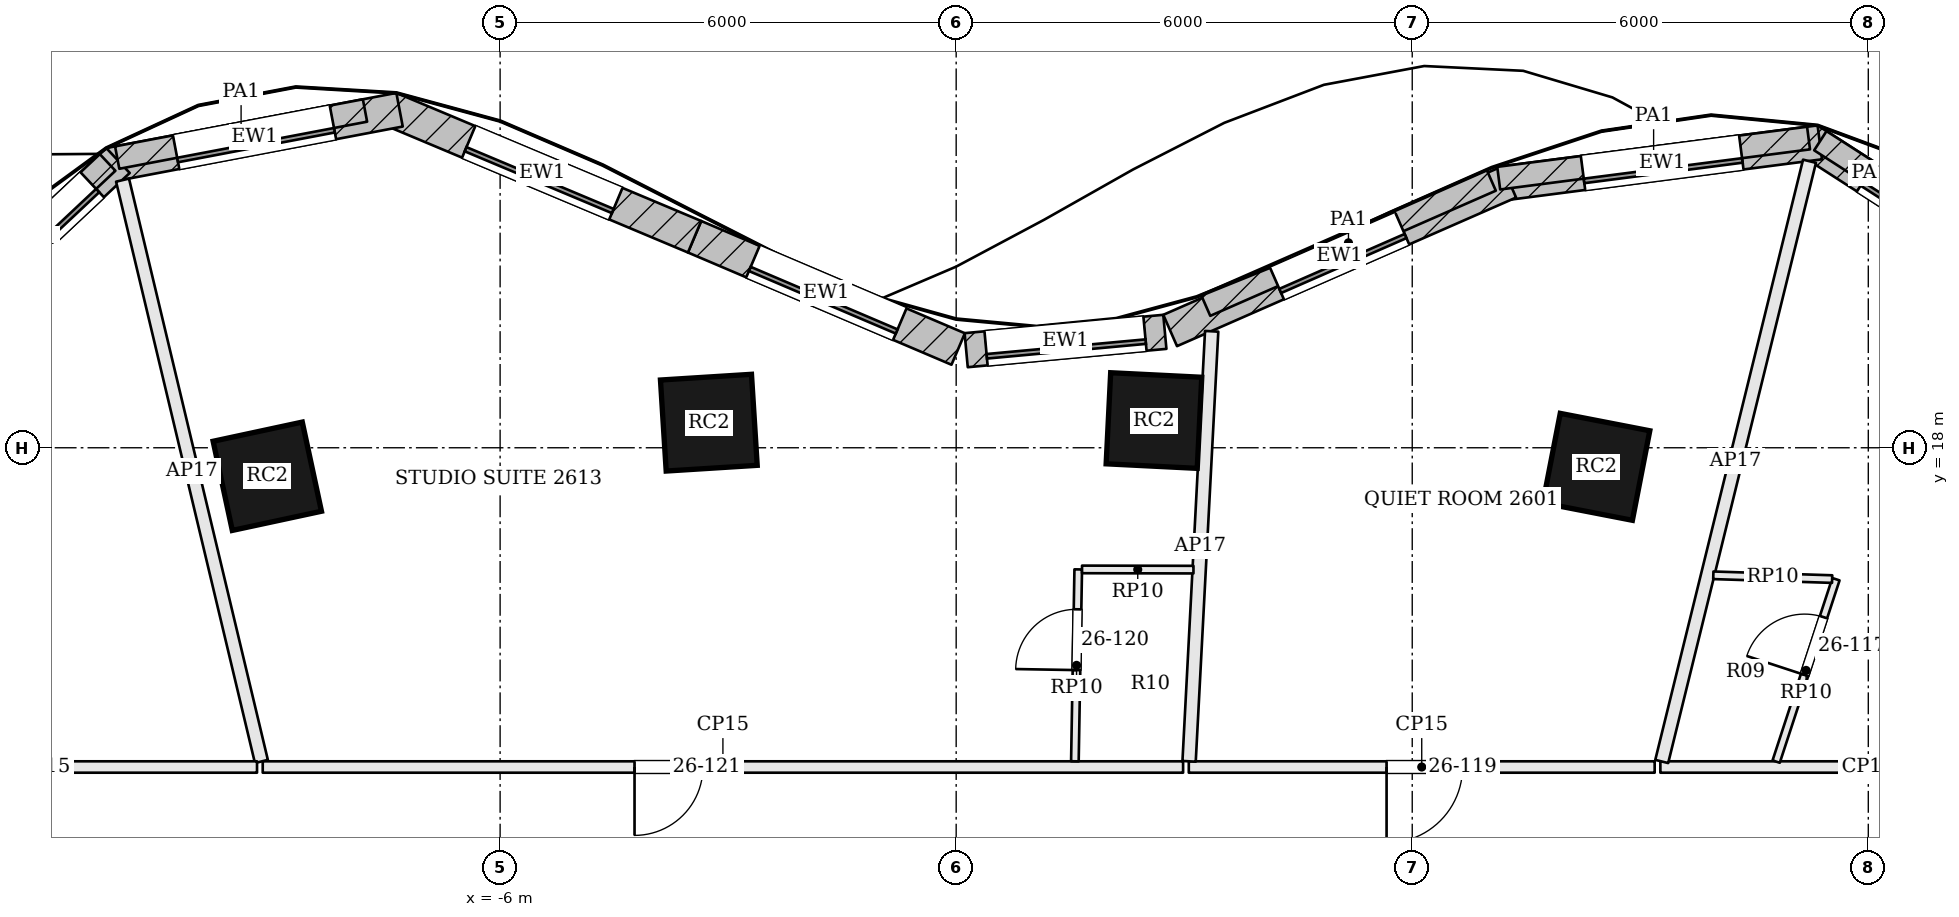
"""IFC4 building model, lengths in metres.
Left out: names, types, materials, properties, quantities, classifications, styles, units other than length and angle.
Written with IfcOpenShell. Run it as: python <this file> out.ifc"""

import sys

from ifc_helpers import new_model, si_unit, direction, frame, frame_2d, origin, origin_2d, place, context, subcontext, project, spatial, rectangle, extrude, element, fill, save


model = new_model("IFC4")
c1 = context("Model", 3, precision=1e-05, world=origin(), true_north=direction((0.0, 1.0)))
c2 = subcontext(c1, "Body", "Model", "MODEL_VIEW")
j1 = project(units=[si_unit("LENGTHUNIT", "METRE"), si_unit("PLANEANGLEUNIT", "RADIAN")], contexts=[c1])
p1 = place(None, origin())
s1 = spatial("IfcSite", under=j1, at=p1, CompositionType="ELEMENT")
p2 = place(p1, origin())
s2 = spatial("IfcBuilding", under=s1, at=p2, CompositionType="ELEMENT")
p3 = place(p2, frame((0.0, 0.0, 110.4)))
s3 = spatial("IfcBuildingStorey", under=s2, at=p3, CompositionType="ELEMENT", Elevation=110.4)
for number, where, z_axis, x_axis in (
    (1, (8.422, 17.749, 0.0), (0.0, 0.0, 1.0), (-0.982, 0.191, 0.0)),
    (2, (2.602, 18.358, 0.0), (0.0, 0.0, 1.0), (-0.999, 0.05, 0.0)),
    (3, (-3.254, 18.33, 0.0), (0.0, 0.0, 1.0), (-0.998, -0.063, 0.0)),
    (4, (-9.063, 17.625, 0.0), (0.0, 0.0, 1.0), (-0.978, -0.21, 0.0)),
):
    element("IfcColumn", number, at=place(p3, frame(where, z_axis=z_axis, x_axis=x_axis)), inside=s3, PredefinedType="COLUMN", context=c2, shape_type="SweptSolid", body=[
        extrude(rectangle(XDim=1.2, YDim=1.2, at=origin_2d()), origin(), (0.0, 0.0, 1.0), 3.6),
    ])
p4 = place(p3, frame((14.499, 19.935, 0.0), z_axis=(0.0, 0.0, 1.0), x_axis=(-0.84080910763, 0.541331732422, 0.0)))
e5 = element("IfcWall", 5, at=p4, inside=s3, PredefinedType="SOLIDWALL", context=c2, shape_type="SweptSolid", body=[
    extrude(rectangle(XDim=3.911, YDim=0.45, at=frame_2d((1.955, 0.0))), origin(), (0.0, 0.0, 1.0), 3.4),
])
p5 = place(p4, frame((0.905, 0.0, 0.9)))
e6 = element("IfcOpeningElement", 6, at=p5, cuts=e5, PredefinedType="OPENING", context=c2, shape_type="SweptSolid", body=[
    extrude(rectangle(XDim=2.1, YDim=2.0, at=frame_2d((1.05, 1.0))), frame((0.0, 0.235, 0.0), z_axis=(0.0, -1.0, 0.0), x_axis=(1.0, 0.0, 0.0)), (0.0, 0.0, 1.0), 0.47),
])
p6 = place(p3, frame((11.362, 22.018, 0.0), z_axis=(0.0, 0.0, 1.0), x_axis=(-0.991724958022, -0.128380713645, 0.0)))
e7 = element("IfcWall", 7, at=p6, inside=s3, PredefinedType="SOLIDWALL", context=c2, shape_type="SweptSolid", body=[
    extrude(rectangle(XDim=4.182, YDim=0.45, at=frame_2d((2.091, 0.0))), origin(), (0.0, 0.0, 1.0), 3.4),
])
p7 = place(p6, frame((1.041, 0.0, 0.9)))
e8 = element("IfcOpeningElement", 8, at=p7, cuts=e7, PredefinedType="OPENING", context=c2, shape_type="SweptSolid", body=[
    extrude(rectangle(XDim=2.1, YDim=2.0, at=frame_2d((1.05, 1.0))), frame((0.0, 0.235, 0.0), z_axis=(0.0, -1.0, 0.0), x_axis=(1.0, 0.0, 0.0)), (0.0, 0.0, 1.0), 0.47),
])
p8 = place(p3, frame((7.276, 21.498, 0.0), z_axis=(0.0, 0.0, 1.0), x_axis=(-0.915872941312, -0.401468249519, 0.0)))
e9 = element("IfcWall", 9, at=p8, inside=s3, PredefinedType="SOLIDWALL", context=c2, shape_type="SweptSolid", body=[
    extrude(rectangle(XDim=4.87, YDim=0.45, at=frame_2d((2.435, 0.0))), origin(), (0.0, 0.0, 1.0), 3.4),
])
p9 = place(p8, frame((1.535, 0.0, 0.9)))
e10 = element("IfcOpeningElement", 10, at=p9, cuts=e9, PredefinedType="OPENING", context=c2, shape_type="SweptSolid", body=[
    extrude(rectangle(XDim=1.8, YDim=2.0, at=frame_2d((0.9, 1.0))), frame((0.0, 0.235, 0.0), z_axis=(0.0, -1.0, 0.0), x_axis=(1.0, 0.0, 0.0)), (0.0, 0.0, 1.0), 0.47),
])
p10 = place(p3, frame((2.745, 19.525, 0.0), z_axis=(0.0, 0.0, 1.0), x_axis=(-0.995768774275, -0.091894222771, 0.0)))
e11 = element("IfcWall", 11, at=p10, inside=s3, PredefinedType="SOLIDWALL", context=c2, shape_type="SweptSolid", body=[
    extrude(rectangle(XDim=2.625, YDim=0.45, at=frame_2d((1.312, 0.0))), origin(), (0.0, 0.0, 1.0), 3.4),
])
p11 = place(p10, frame((0.262, 0.0, 0.9)))
e12 = element("IfcOpeningElement", 12, at=p11, cuts=e11, PredefinedType="OPENING", context=c2, shape_type="SweptSolid", body=[
    extrude(rectangle(XDim=2.1, YDim=2.0, at=frame_2d((1.05, 1.0))), frame((0.0, 0.235, 0.0), z_axis=(0.0, -1.0, 0.0), x_axis=(1.0, 0.0, 0.0)), (0.0, 0.0, 1.0), 0.47),
])
p12 = place(p3, frame((0.026, 19.299, 0.0), z_axis=(0.0, 0.0, 1.0), x_axis=(-0.920040408927, 0.391823488245, 0.0)))
e13 = element("IfcWall", 13, at=p12, inside=s3, PredefinedType="SOLIDWALL", context=c2, shape_type="SweptSolid", body=[
    extrude(rectangle(XDim=3.77, YDim=0.45, at=frame_2d((1.885, 0.0))), origin(), (0.0, 0.0, 1.0), 3.4),
])
p13 = place(p12, frame((0.835, 0.0, 0.9)))
e14 = element("IfcOpeningElement", 14, at=p13, cuts=e13, PredefinedType="OPENING", context=c2, shape_type="SweptSolid", body=[
    extrude(rectangle(XDim=2.1, YDim=2.0, at=frame_2d((1.05, 1.0))), frame((0.0, 0.235, 0.0), z_axis=(0.0, -1.0, 0.0), x_axis=(1.0, 0.0, 0.0)), (0.0, 0.0, 1.0), 0.47),
])
p14 = place(p3, frame((-3.441, 20.776, 0.0), z_axis=(0.0, 0.0, 1.0), x_axis=(-0.921988121387, 0.387218160758, 0.0)))
e15 = element("IfcWall", 15, at=p14, inside=s3, PredefinedType="SOLIDWALL", context=c2, shape_type="SweptSolid", body=[
    extrude(rectangle(XDim=4.347, YDim=0.45, at=frame_2d((2.173, 0.0))), origin(), (0.0, 0.0, 1.0), 3.4),
])
p15 = place(p14, frame((1.123, 0.0, 0.9)))
e16 = element("IfcOpeningElement", 16, at=p15, cuts=e15, PredefinedType="OPENING", context=c2, shape_type="SweptSolid", body=[
    extrude(rectangle(XDim=2.1, YDim=2.0, at=frame_2d((1.05, 1.0))), frame((0.0, 0.235, 0.0), z_axis=(0.0, -1.0, 0.0), x_axis=(1.0, 0.0, 0.0)), (0.0, 0.0, 1.0), 0.47),
])
p16 = place(p3, frame((-7.323, 22.447, 0.0), z_axis=(0.0, 0.0, 1.0), x_axis=(-0.982420993638, -0.18667884524, 0.0)))
e17 = element("IfcWall", 17, at=p16, inside=s3, PredefinedType="SOLIDWALL", context=c2, shape_type="SweptSolid", body=[
    extrude(rectangle(XDim=3.884, YDim=0.45, at=frame_2d((1.942, 0.0))), origin(), (0.0, 0.0, 1.0), 3.4),
])
p17 = place(p16, frame((0.892, 0.0, 0.9)))
e18 = element("IfcOpeningElement", 18, at=p17, cuts=e17, PredefinedType="OPENING", context=c2, shape_type="SweptSolid", body=[
    extrude(rectangle(XDim=2.1, YDim=2.0, at=frame_2d((1.05, 1.0))), frame((0.0, 0.235, 0.0), z_axis=(0.0, -1.0, 0.0), x_axis=(1.0, 0.0, 0.0)), (0.0, 0.0, 1.0), 0.47),
])
p18 = place(p3, frame((-11.027, 21.779, 0.0), z_axis=(0.0, 0.0, 1.0), x_axis=(-0.728871214251, -0.684650825631, 0.0)))
e19 = element("IfcWall", 19, at=p18, inside=s3, PredefinedType="SOLIDWALL", context=c2, shape_type="SweptSolid", body=[
    extrude(rectangle(XDim=3.031, YDim=0.45, at=frame_2d((1.516, 0.0))), origin(), (0.0, 0.0, 1.0), 3.4),
])
p19 = place(p18, frame((0.466, 0.0, 0.9)))
e20 = element("IfcOpeningElement", 20, at=p19, cuts=e19, PredefinedType="OPENING", context=c2, shape_type="SweptSolid", body=[
    extrude(rectangle(XDim=2.1, YDim=2.0, at=frame_2d((1.05, 1.0))), frame((0.0, 0.235, 0.0), z_axis=(0.0, -1.0, 0.0), x_axis=(1.0, 0.0, 0.0)), (0.0, 0.0, 1.0), 0.47),
])
p20 = place(p3, frame((12.68, 21.195, 3.6), z_axis=(0.0, 0.0, 1.0), x_axis=(-0.840806975541, 0.541335044018, 0.0)))
e21 = element("IfcWall", 21, at=p20, inside=s3, PredefinedType="PARAPET", context=c2, shape_type="SweptSolid", body=[
    extrude(rectangle(XDim=1.56, YDim=0.3, at=frame_2d((0.78, 0.0))), origin(), (0.0, 0.0, 1.0), 1.1),
])
p21 = place(p3, frame((11.214, 22.074, 3.6), z_axis=(0.0, 0.0, 1.0), x_axis=(-0.991727449614, -0.128361464939, 0.0)))
e22 = element("IfcWall", 22, at=p21, inside=s3, PredefinedType="PARAPET", context=c2, shape_type="SweptSolid", body=[
    extrude(rectangle(XDim=4.11, YDim=0.3, at=frame_2d((2.055, 0.0))), origin(), (0.0, 0.0, 1.0), 1.1),
])
p22 = place(p3, frame((7.039, 21.519, 3.6), z_axis=(0.0, 0.0, 1.0), x_axis=(-0.915890739732, -0.401427643384, 0.0)))
e23 = element("IfcWall", 23, at=p22, inside=s3, PredefinedType="PARAPET", context=c2, shape_type="SweptSolid", body=[
    extrude(rectangle(XDim=4.102, YDim=0.3, at=frame_2d((2.051, 0.0))), origin(), (0.0, 0.0, 1.0), 1.1),
])
p23 = place(p3, frame((-7.778, 22.437, 3.6), z_axis=(0.0, 0.0, 1.0), x_axis=(-0.98241446716, -0.186713188382, 0.0)))
e24 = element("IfcWall", 24, at=p23, inside=s3, PredefinedType="PARAPET", context=c2, shape_type="SweptSolid", body=[
    extrude(rectangle(XDim=3.319, YDim=0.3, at=frame_2d((1.659, 0.0))), origin(), (0.0, 0.0, 1.0), 1.1),
])
p24 = place(p3, frame((-11.164, 21.753, 3.6), z_axis=(0.0, 0.0, 1.0), x_axis=(-0.72886475222, -0.684657704967, 0.0)))
e25 = element("IfcWall", 25, at=p24, inside=s3, PredefinedType="PARAPET", context=c2, shape_type="SweptSolid", body=[
    extrude(rectangle(XDim=2.877, YDim=0.3, at=frame_2d((1.438, 0.0))), origin(), (0.0, 0.0, 1.0), 1.1),
])
p25 = place(p3, frame((14.725, 13.8, 0.0), z_axis=(0.0, 0.0, 1.0), x_axis=(-1.0, 0.0, 0.0)))
e26 = element("IfcWall", 26, at=p25, inside=s3, PredefinedType="PARTITIONING", context=c2, shape_type="SweptSolid", body=[
    extrude(rectangle(XDim=5.461, YDim=0.15, at=frame_2d((2.73, 0.0))), origin(), (0.0, 0.0, 1.0), 2.784),
])
p26 = place(p3, frame((11.227, 21.769, 0.0), z_axis=(0.0, 0.0, 1.0), x_axis=(-0.23905867542, -0.971005123419, 0.0)))
e27 = element("IfcWall", 27, at=p26, inside=s3, PredefinedType="PARTITIONING", context=c2, shape_type="SweptSolid", body=[
    extrude(rectangle(XDim=8.132, YDim=0.175, at=frame_2d((4.066, 0.0))), origin(), (0.0, 0.0, 1.0), 2.784),
])
p27 = place(p3, frame((9.189, 13.8, 0.0), z_axis=(0.0, 0.0, 1.0), x_axis=(-1.0, 0.0, 0.0)))
e28 = element("IfcWall", 28, at=p27, inside=s3, PredefinedType="PARTITIONING", context=c2, shape_type="SweptSolid", body=[
    extrude(rectangle(XDim=6.129, YDim=0.15, at=frame_2d((3.064, 0.0))), origin(), (0.0, 0.0, 1.0), 2.784),
])
p28 = place(p27, frame((2.527, 0.0, 0.0)))
e29 = element("IfcOpeningElement", 29, at=p28, cuts=e28, PredefinedType="OPENING", context=c2, shape_type="SweptSolid", body=[
    extrude(rectangle(XDim=1.0, YDim=2.1, at=frame_2d((0.5, 1.05))), frame((0.0, 0.085, 0.0), z_axis=(0.0, -1.0, 0.0), x_axis=(1.0, 0.0, 0.0)), (0.0, 0.0, 1.0), 0.17),
])
p29 = place(p3, frame((3.361, 19.532, 0.0), z_axis=(0.0, 0.0, 1.0), x_axis=(-0.052405019424, -0.998625912912, 0.0)))
e30 = element("IfcWall", 30, at=p29, inside=s3, PredefinedType="PARTITIONING", context=c2, shape_type="SweptSolid", body=[
    extrude(rectangle(XDim=5.665, YDim=0.175, at=frame_2d((2.833, 0.0))), origin(), (0.0, 0.0, 1.0), 2.784),
])
p30 = place(p3, frame((2.986, 13.8, 0.0), z_axis=(0.0, 0.0, 1.0), x_axis=(-1.0, 0.0, 0.0)))
e31 = element("IfcWall", 31, at=p30, inside=s3, PredefinedType="PARTITIONING", context=c2, shape_type="SweptSolid", body=[
    extrude(rectangle(XDim=12.109, YDim=0.15, at=frame_2d((6.054, 0.0))), origin(), (0.0, 0.0, 1.0), 2.784),
])
p31 = place(p30, frame((6.317, 0.0, 0.0)))
e32 = element("IfcOpeningElement", 32, at=p31, cuts=e31, PredefinedType="OPENING", context=c2, shape_type="SweptSolid", body=[
    extrude(rectangle(XDim=0.9, YDim=2.4, at=frame_2d((0.45, 1.2))), frame((0.0, 0.085, 0.0), z_axis=(0.0, -1.0, 0.0), x_axis=(1.0, 0.0, 0.0)), (0.0, 0.0, 1.0), 0.17),
])
p32 = place(p3, frame((-10.967, 21.521, 0.0), z_axis=(0.0, 0.0, 1.0), x_axis=(0.23233123525, -0.972636724131, 0.0)))
e33 = element("IfcWall", 33, at=p32, inside=s3, PredefinedType="PARTITIONING", context=c2, shape_type="SweptSolid", body=[
    extrude(rectangle(XDim=7.863, YDim=0.175, at=frame_2d((3.932, 0.0))), origin(), (0.0, 0.0, 1.0), 2.784),
])
p33 = place(p3, frame((-9.198, 13.8, 0.0), z_axis=(0.0, 0.0, 1.0), x_axis=(-1.0, 0.0, 0.0)))
e34 = element("IfcWall", 34, at=p33, inside=s3, PredefinedType="PARTITIONING", context=c2, shape_type="SweptSolid", body=[
    extrude(rectangle(XDim=5.602, YDim=0.15, at=frame_2d((2.801, 0.0))), origin(), (0.0, 0.0, 1.0), 2.784),
])
p34 = place(p3, frame((10.788, 13.871, 0.0), z_axis=(0.0, 0.0, 1.0), x_axis=(0.311553531795, 0.950228602404, 0.0)))
e35 = element("IfcWall", 35, at=p34, inside=s3, PredefinedType="PARTITIONING", context=c2, shape_type="SweptSolid", body=[
    extrude(rectangle(XDim=2.525, YDim=0.1, at=frame_2d((1.262, 0.0))), origin(), (0.0, 0.0, 1.0), 2.884),
])
p35 = place(p34, frame((1.2, 0.0, 0.0)))
e36 = element("IfcOpeningElement", 36, at=p35, cuts=e35, PredefinedType="OPENING", context=c2, shape_type="SweptSolid", body=[
    extrude(rectangle(XDim=0.8, YDim=2.1, at=frame_2d((0.4, 1.05))), frame((0.0, 0.06, 0.0), z_axis=(0.0, -1.0, 0.0), x_axis=(1.0, 0.0, 0.0)), (0.0, 0.0, 1.0), 0.12),
])
p36 = place(p3, frame((11.524, 16.272, 0.0), z_axis=(0.0, 0.0, 1.0), x_axis=(-0.99948787379, 0.03199984603, 0.0)))
e37 = element("IfcWall", 37, at=p36, inside=s3, PredefinedType="PARTITIONING", context=c2, shape_type="SweptSolid", body=[
    extrude(rectangle(XDim=1.564, YDim=0.1, at=frame_2d((0.782, 0.0))), origin(), (0.0, 0.0, 1.0), 2.884),
])
p37 = place(p3, frame((1.562, 13.875, 0.0), z_axis=(0.0, 0.0, 1.0), x_axis=(0.017403804044, 0.999848542333, 0.0)))
e38 = element("IfcWall", 38, at=p37, inside=s3, PredefinedType="PARTITIONING", context=c2, shape_type="SweptSolid", body=[
    extrude(rectangle(XDim=2.525, YDim=0.1, at=frame_2d((1.263, 0.0))), origin(), (0.0, 0.0, 1.0), 2.884),
])
p38 = place(p37, frame((1.2, 0.0, 0.0)))
e39 = element("IfcOpeningElement", 39, at=p38, cuts=e38, PredefinedType="OPENING", context=c2, shape_type="SweptSolid", body=[
    extrude(rectangle(XDim=0.8, YDim=2.1, at=frame_2d((0.4, 1.05))), frame((0.0, 0.06, 0.0), z_axis=(0.0, -1.0, 0.0), x_axis=(1.0, 0.0, 0.0)), (0.0, 0.0, 1.0), 0.12),
])
p39 = place(p3, frame((1.656, 16.399, 0.0), z_axis=(0.0, 0.0, 1.0), x_axis=(0.99999800267, -0.001998663563, 0.0)))
e40 = element("IfcWall", 40, at=p39, inside=s3, PredefinedType="PARTITIONING", context=c2, shape_type="SweptSolid", body=[
    extrude(rectangle(XDim=1.466, YDim=0.1, at=frame_2d((0.733, 0.0))), origin(), (0.0, 0.0, 1.0), 2.884),
])
p40 = place(p5, origin())
e41 = element("IfcWindow", 41, at=p40, inside=s3, PartitioningType="SINGLE_PANEL", PredefinedType="WINDOW", context=c2, shape_type="SweptSolid", body=[
    extrude(rectangle(XDim=2.1, YDim=2.0, at=frame_2d((1.05, 1.0))), frame((0.0, 0.135, 0.0), z_axis=(0.0, -1.0, 0.0), x_axis=(1.0, 0.0, 0.0)), (0.0, 0.0, 1.0), 0.06),
])
fill(e6, e41)
p41 = place(p7, origin())
e42 = element("IfcWindow", 42, at=p41, inside=s3, PartitioningType="SINGLE_PANEL", PredefinedType="WINDOW", context=c2, shape_type="SweptSolid", body=[
    extrude(rectangle(XDim=2.1, YDim=2.0, at=frame_2d((1.05, 1.0))), frame((0.0, 0.135, 0.0), z_axis=(0.0, -1.0, 0.0), x_axis=(1.0, 0.0, 0.0)), (0.0, 0.0, 1.0), 0.06),
])
fill(e8, e42)
p42 = place(p9, origin())
e43 = element("IfcWindow", 43, at=p42, inside=s3, PartitioningType="SINGLE_PANEL", PredefinedType="WINDOW", context=c2, shape_type="SweptSolid", body=[
    extrude(rectangle(XDim=1.8, YDim=2.0, at=frame_2d((0.9, 1.0))), frame((0.0, 0.135, 0.0), z_axis=(0.0, -1.0, 0.0), x_axis=(1.0, 0.0, 0.0)), (0.0, 0.0, 1.0), 0.06),
])
fill(e10, e43)
p43 = place(p11, origin())
e44 = element("IfcWindow", 44, at=p43, inside=s3, PartitioningType="SINGLE_PANEL", PredefinedType="WINDOW", context=c2, shape_type="SweptSolid", body=[
    extrude(rectangle(XDim=2.1, YDim=2.0, at=frame_2d((1.05, 1.0))), frame((0.0, 0.135, 0.0), z_axis=(0.0, -1.0, 0.0), x_axis=(1.0, 0.0, 0.0)), (0.0, 0.0, 1.0), 0.06),
])
fill(e12, e44)
p44 = place(p13, origin())
e45 = element("IfcWindow", 45, at=p44, inside=s3, PartitioningType="SINGLE_PANEL", PredefinedType="WINDOW", context=c2, shape_type="SweptSolid", body=[
    extrude(rectangle(XDim=2.1, YDim=2.0, at=frame_2d((1.05, 1.0))), frame((0.0, 0.135, 0.0), z_axis=(0.0, -1.0, 0.0), x_axis=(1.0, 0.0, 0.0)), (0.0, 0.0, 1.0), 0.06),
])
fill(e14, e45)
p45 = place(p15, origin())
e46 = element("IfcWindow", 46, at=p45, inside=s3, PartitioningType="SINGLE_PANEL", PredefinedType="WINDOW", context=c2, shape_type="SweptSolid", body=[
    extrude(rectangle(XDim=2.1, YDim=2.0, at=frame_2d((1.05, 1.0))), frame((0.0, 0.135, 0.0), z_axis=(0.0, -1.0, 0.0), x_axis=(1.0, 0.0, 0.0)), (0.0, 0.0, 1.0), 0.06),
])
fill(e16, e46)
p46 = place(p17, origin())
e47 = element("IfcWindow", 47, at=p46, inside=s3, PartitioningType="SINGLE_PANEL", PredefinedType="WINDOW", context=c2, shape_type="SweptSolid", body=[
    extrude(rectangle(XDim=2.1, YDim=2.0, at=frame_2d((1.05, 1.0))), frame((0.0, 0.135, 0.0), z_axis=(0.0, -1.0, 0.0), x_axis=(1.0, 0.0, 0.0)), (0.0, 0.0, 1.0), 0.06),
])
fill(e18, e47)
p47 = place(p19, origin())
e48 = element("IfcWindow", 48, at=p47, inside=s3, PartitioningType="SINGLE_PANEL", PredefinedType="WINDOW", context=c2, shape_type="SweptSolid", body=[
    extrude(rectangle(XDim=2.1, YDim=2.0, at=frame_2d((1.05, 1.0))), frame((0.0, 0.135, 0.0), z_axis=(0.0, -1.0, 0.0), x_axis=(1.0, 0.0, 0.0)), (0.0, 0.0, 1.0), 0.06),
])
fill(e20, e48)
p48 = place(p35, origin())
e49 = element("IfcDoor", 49, at=p48, inside=s3, OperationType="SINGLE_SWING_LEFT", PredefinedType="DOOR", context=c2, shape_type="SweptSolid", body=[
    extrude(rectangle(XDim=0.8, YDim=2.1, at=frame_2d((0.4, 1.05))), frame((0.0, 0.025, 0.0), z_axis=(0.0, -1.0, 0.0), x_axis=(1.0, 0.0, 0.0)), (0.0, 0.0, 1.0), 0.05),
])
fill(e36, e49)
p49 = place(p28, origin())
e50 = element("IfcDoor", 50, at=p49, inside=s3, OperationType="SINGLE_SWING_RIGHT", PredefinedType="DOOR", context=c2, shape_type="SweptSolid", body=[
    extrude(rectangle(XDim=1.0, YDim=2.1, at=frame_2d((0.5, 1.05))), frame((0.0, 0.025, 0.0), z_axis=(0.0, -1.0, 0.0), x_axis=(1.0, 0.0, 0.0)), (0.0, 0.0, 1.0), 0.05),
])
fill(e29, e50)
p50 = place(p38, origin())
e51 = element("IfcDoor", 51, at=p50, inside=s3, OperationType="SINGLE_SWING_LEFT", PredefinedType="DOOR", context=c2, shape_type="SweptSolid", body=[
    extrude(rectangle(XDim=0.8, YDim=2.1, at=frame_2d((0.4, 1.05))), frame((0.0, 0.025, 0.0), z_axis=(0.0, -1.0, 0.0), x_axis=(1.0, 0.0, 0.0)), (0.0, 0.0, 1.0), 0.05),
])
fill(e39, e51)
p51 = place(p31, origin())
e52 = element("IfcDoor", 52, at=p51, inside=s3, OperationType="SINGLE_SWING_RIGHT", PredefinedType="DOOR", context=c2, shape_type="SweptSolid", body=[
    extrude(rectangle(XDim=0.9, YDim=2.4, at=frame_2d((0.45, 1.2))), frame((0.0, 0.025, 0.0), z_axis=(0.0, -1.0, 0.0), x_axis=(1.0, 0.0, 0.0)), (0.0, 0.0, 1.0), 0.05),
])
fill(e32, e52)
save(model, sys.argv[1])
